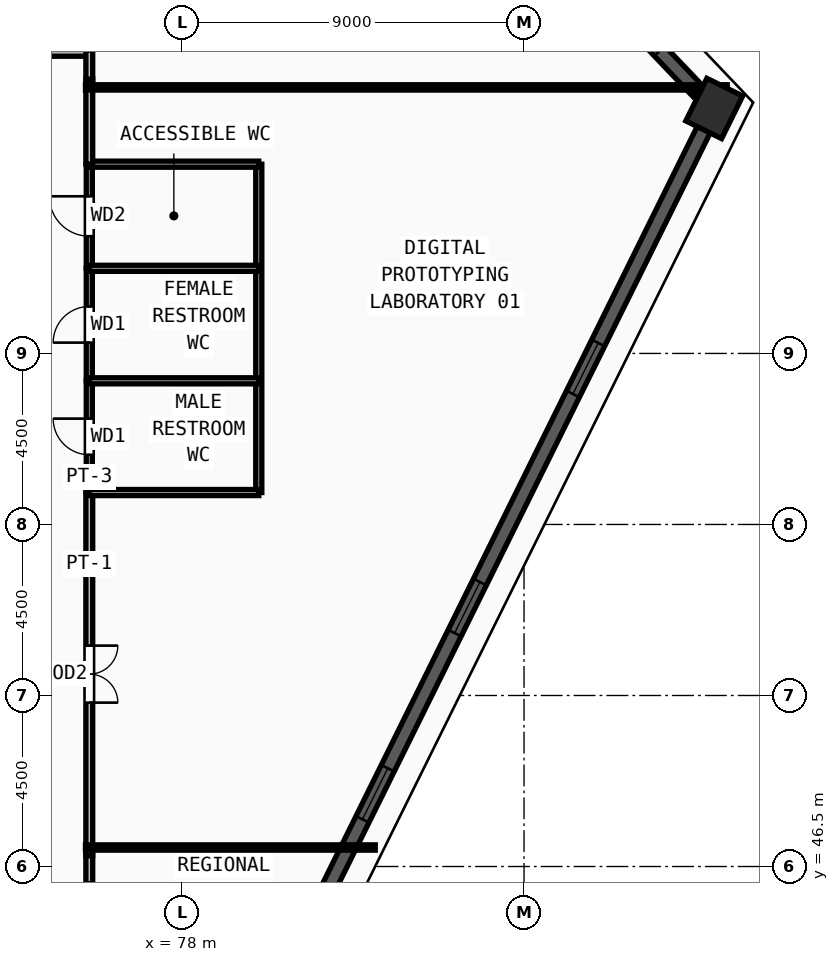
"""IFC4 building model, lengths in metres.
Left out: names, types, materials, properties, quantities, classifications, styles, units other than length and angle.
Written with IfcOpenShell. Run it as: python <this file> out.ifc"""

import sys

from ifc_helpers import new_model, si_unit, direction, frame, frame_2d, origin, origin_2d, place, context, subcontext, project, spatial, rectangle, extrude, source, transform, mapped, element, fill, save


model = new_model("IFC4")
c1 = context("Model", 3, precision=1e-05, world=origin(), true_north=direction((0.0, 1.0)))
c2 = subcontext(c1, "Body", "Model", "MODEL_VIEW")
j1 = project(units=[si_unit("LENGTHUNIT", "METRE"), si_unit("PLANEANGLEUNIT", "RADIAN")], contexts=[c1])
p1 = place(None, origin())
s1 = spatial("IfcSite", under=j1, at=p1, CompositionType="ELEMENT")
p2 = place(p1, origin())
s2 = spatial("IfcBuilding", under=s1, at=p2, CompositionType="ELEMENT")
p3 = place(p2, frame((0.0, 0.0, 247.5)))
s3 = spatial("IfcBuildingStorey", under=s2, at=p3, CompositionType="ELEMENT", Elevation=247.5)
m1 = source(origin(), c2, "Body", "SweptSolid", [
    extrude(rectangle(XDim=1.25, YDim=1.05, at=origin_2d()), origin(), (0.0, 0.0, 1.0), 3.75),
])
p4 = place(p3, frame((92.005, 66.446, 0.0), z_axis=(0.0, 0.0, 1.0), x_axis=(0.443540529265, 0.896254315973, 0.0)))
e1 = element("IfcColumn", 1, at=p4, inside=s3, PredefinedType="COLUMN", context=c2, shape_type="MappedRepresentation", body=[
    mapped(m1, transform((0.0, 0.0, 0.0), x_axis=(1.0, 0.0, 0.0), y_axis=(0.0, 1.0, 0.0), z_axis=(0.0, 0.0, 1.0), scale=1.0)),
])
p5 = place(p3, frame((79.281, 40.733, 0.0), z_axis=(0.0, 0.0, 1.0), x_axis=(0.44350165784, 0.896273551709, 0.0)))
e2 = element("IfcWall", 2, at=p5, inside=s3, PredefinedType="SOLIDWALL", context=c2, shape_type="SweptSolid", body=[
    extrude(rectangle(XDim=28.074, YDim=0.38, at=frame_2d((14.037, 0.0))), origin(), (0.0, 0.0, 1.0), 3.57),
])
m2 = source(origin(), c2, "Body", "SweptSolid", [
    extrude(rectangle(XDim=1.5, YDim=1.9, at=frame_2d((0.75, 0.95))), frame((0.0, 0.2, 0.0), z_axis=(0.0, -1.0, 0.0), x_axis=(1.0, 0.0, 0.0)), (0.0, 0.0, 1.0), 0.4),
])
p6 = place(p5, frame((7.819, 0.0, 0.55)))
e3 = element("IfcOpeningElement", 3, at=p6, cuts=e2, PredefinedType="OPENING", context=c2, shape_type="MappedRepresentation", body=[
    mapped(m2, transform((0.0, 0.0, 0.0), x_axis=(1.0, 0.0, 0.0), y_axis=(0.0, 1.0, 0.0), z_axis=(0.0, 0.0, 1.0), scale=1.0)),
])
p7 = place(p5, frame((13.287, 0.0, 0.55)))
e4 = element("IfcOpeningElement", 4, at=p7, cuts=e2, PredefinedType="OPENING", context=c2, shape_type="MappedRepresentation", body=[
    mapped(m2, transform((0.0, 0.0, 0.0), x_axis=(1.0, 0.0, 0.0), y_axis=(0.0, 1.0, 0.0), z_axis=(0.0, 0.0, 1.0), scale=1.0)),
])
p8 = place(p5, frame((20.306, 0.0, 0.55)))
e5 = element("IfcOpeningElement", 5, at=p8, cuts=e2, PredefinedType="OPENING", context=c2, shape_type="MappedRepresentation", body=[
    mapped(m2, transform((0.0, 0.0, 0.0), x_axis=(1.0, 0.0, 0.0), y_axis=(0.0, 1.0, 0.0), z_axis=(0.0, 0.0, 1.0), scale=1.0)),
])
p9 = place(p3, frame((91.581, 66.892, 0.0), z_axis=(0.0, 0.0, 1.0), x_axis=(-0.689387303183, 0.724392950139, 0.0)))
e6 = element("IfcWall", 6, at=p9, inside=s3, PredefinedType="SOLIDWALL", context=c2, shape_type="SweptSolid", body=[
    extrude(rectangle(XDim=4.143, YDim=0.38, at=frame_2d((2.071, 0.0))), origin(), (0.0, 0.0, 1.0), 3.57),
])
m3 = source(origin(), c2, "Body", "SweptSolid", [
    extrude(rectangle(XDim=1.2, YDim=1.9, at=frame_2d((0.6, 0.95))), frame((0.0, 0.2, 0.0), z_axis=(0.0, -1.0, 0.0), x_axis=(1.0, 0.0, 0.0)), (0.0, 0.0, 1.0), 0.4),
])
p10 = place(p9, frame((1.471, 0.0, 0.55)))
e7 = element("IfcOpeningElement", 7, at=p10, cuts=e6, PredefinedType="OPENING", context=c2, shape_type="MappedRepresentation", body=[
    mapped(m3, transform((0.0, 0.0, 0.0), x_axis=(1.0, 0.0, 0.0), y_axis=(0.0, 1.0, 0.0), z_axis=(0.0, 0.0, 1.0), scale=1.0)),
])
p11 = place(p3, frame((75.56, 56.34, 0.0), z_axis=(0.0, 0.0, 1.0), x_axis=(0.0, 1.0, 0.0)))
e8 = element("IfcWall", 8, at=p11, inside=s3, PredefinedType="PARTITIONING", context=c2, shape_type="SweptSolid", body=[
    extrude(rectangle(XDim=2.94, YDim=0.16, at=frame_2d((1.47, 0.0))), origin(), (0.0, 0.0, 1.0), 3.57),
])
m4 = source(origin(), c2, "Body", "SweptSolid", [
    extrude(rectangle(XDim=0.95, YDim=2.15, at=frame_2d((0.475, 1.075))), frame((0.0, 0.09, 0.0), z_axis=(0.0, -1.0, 0.0), x_axis=(1.0, 0.0, 0.0)), (0.0, 0.0, 1.0), 0.18),
])
p12 = place(p11, frame((0.995, 0.0, 0.0)))
e9 = element("IfcOpeningElement", 9, at=p12, cuts=e8, PredefinedType="OPENING", context=c2, shape_type="MappedRepresentation", body=[
    mapped(m4, transform((0.0, 0.0, 0.0), x_axis=(1.0, 0.0, 0.0), y_axis=(0.0, 1.0, 0.0), z_axis=(0.0, 0.0, 1.0), scale=1.0)),
])
p13 = place(p3, frame((75.56, 59.28, 0.0), z_axis=(0.0, 0.0, 1.0), x_axis=(0.0, 1.0, 0.0)))
e10 = element("IfcWall", 10, at=p13, inside=s3, PredefinedType="PARTITIONING", context=c2, shape_type="SweptSolid", body=[
    extrude(rectangle(XDim=2.96, YDim=0.16, at=frame_2d((1.48, 0.0))), origin(), (0.0, 0.0, 1.0), 3.57),
])
p14 = place(p13, frame((1.005, 0.0, 0.0)))
e11 = element("IfcOpeningElement", 11, at=p14, cuts=e10, PredefinedType="OPENING", context=c2, shape_type="MappedRepresentation", body=[
    mapped(m4, transform((0.0, 0.0, 0.0), x_axis=(1.0, 0.0, 0.0), y_axis=(0.0, 1.0, 0.0), z_axis=(0.0, 0.0, 1.0), scale=1.0)),
])
p15 = place(p3, frame((75.56, 62.24, 0.0), z_axis=(0.0, 0.0, 1.0), x_axis=(0.0, 1.0, 0.0)))
e12 = element("IfcWall", 12, at=p15, inside=s3, PredefinedType="PARTITIONING", context=c2, shape_type="SweptSolid", body=[
    extrude(rectangle(XDim=2.74, YDim=0.16, at=frame_2d((1.37, 0.0))), origin(), (0.0, 0.0, 1.0), 3.57),
])
m5 = source(origin(), c2, "Body", "SweptSolid", [
    extrude(rectangle(XDim=1.05, YDim=2.15, at=frame_2d((0.525, 1.075))), frame((0.0, 0.09, 0.0), z_axis=(0.0, -1.0, 0.0), x_axis=(1.0, 0.0, 0.0)), (0.0, 0.0, 1.0), 0.18),
])
p16 = place(p15, frame((0.845, 0.0, 0.0)))
e13 = element("IfcOpeningElement", 13, at=p16, cuts=e12, PredefinedType="OPENING", context=c2, shape_type="MappedRepresentation", body=[
    mapped(m5, transform((0.0, 0.0, 0.0), x_axis=(1.0, 0.0, 0.0), y_axis=(0.0, 1.0, 0.0), z_axis=(0.0, 0.0, 1.0), scale=1.0)),
])
p17 = place(p3, frame((75.56, 56.34, 0.0), z_axis=(0.0, 0.0, 1.0), x_axis=(0.0, -1.0, 0.0)))
e14 = element("IfcWall", 14, at=p17, inside=s3, PredefinedType="PARTITIONING", context=c2, shape_type="SweptSolid", body=[
    extrude(rectangle(XDim=9.555, YDim=0.18, at=frame_2d((4.778, 0.0))), origin(), (0.0, 0.0, 1.0), 3.57),
])
m6 = source(origin(), c2, "Body", "SweptSolid", [
    extrude(rectangle(XDim=1.5, YDim=2.2, at=frame_2d((0.75, 1.1))), frame((0.0, 0.1, 0.0), z_axis=(0.0, -1.0, 0.0), x_axis=(1.0, 0.0, 0.0)), (0.0, 0.0, 1.0), 0.2),
])
p18 = place(p17, frame((4.028, 0.0, 0.0)))
e15 = element("IfcOpeningElement", 15, at=p18, cuts=e14, PredefinedType="OPENING", context=c2, shape_type="MappedRepresentation", body=[
    mapped(m6, transform((0.0, 0.0, 0.0), x_axis=(1.0, 0.0, 0.0), y_axis=(0.0, 1.0, 0.0), z_axis=(0.0, 0.0, 1.0), scale=1.0)),
])
p19 = place(p3, frame((67.285, 67.91, 0.0), z_axis=(0.0, 0.0, 1.0), x_axis=(1.0, 0.0, 0.0)))
e16 = element("IfcWall", 16, at=p19, inside=s3, PredefinedType="PARTITIONING", context=c2, shape_type="SweptSolid", body=[
    extrude(rectangle(XDim=8.345, YDim=0.18, at=frame_2d((4.172, 0.0))), origin(), (0.0, 0.0, 1.0), 3.205),
])
p20 = place(p19, frame((3.422, 0.0, 0.0)))
e17 = element("IfcOpeningElement", 17, at=p20, cuts=e16, PredefinedType="OPENING", context=c2, shape_type="MappedRepresentation", body=[
    mapped(m6, transform((0.0, 0.0, 0.0), x_axis=(1.0, 0.0, 0.0), y_axis=(0.0, 1.0, 0.0), z_axis=(0.0, 0.0, 1.0), scale=1.0)),
])
p21 = place(p3, frame((75.56, 46.785, 0.0), z_axis=(0.0, 0.0, 1.0), x_axis=(0.0, -1.0, 0.0)))
e18 = element("IfcWall", 18, at=p21, inside=s3, PredefinedType="PARTITIONING", context=c2, shape_type="SweptSolid", body=[
    extrude(rectangle(XDim=2.4, YDim=0.18, at=frame_2d((1.2, 0.0))), origin(), (0.0, 0.0, 1.0), 3.57),
])
m7 = source(origin(), c2, "Body", "SweptSolid", [
    extrude(rectangle(XDim=1.0, YDim=2.2, at=frame_2d((0.5, 1.1))), frame((0.0, 0.1, 0.0), z_axis=(0.0, -1.0, 0.0), x_axis=(1.0, 0.0, 0.0)), (0.0, 0.0, 1.0), 0.2),
])
p22 = place(p21, frame((0.7, 0.0, 0.0)))
e19 = element("IfcOpeningElement", 19, at=p22, cuts=e18, PredefinedType="OPENING", context=c2, shape_type="MappedRepresentation", body=[
    mapped(m7, transform((0.0, 0.0, 0.0), x_axis=(1.0, 0.0, 0.0), y_axis=(0.0, 1.0, 0.0), z_axis=(0.0, 0.0, 1.0), scale=1.0)),
])
p23 = place(p3, frame((80.02, 56.34, 0.0), z_axis=(0.0, 0.0, 1.0), x_axis=(0.0, 1.0, 0.0)))
e20 = element("IfcWall", 20, at=p23, inside=s3, PredefinedType="PARTITIONING", context=c2, shape_type="SweptSolid", body=[
    extrude(rectangle(XDim=8.64, YDim=0.16, at=frame_2d((4.32, 0.0))), origin(), (0.0, 0.0, 1.0), 3.57),
])
for number, where, z_axis, x_axis in (
    (21, (75.56, 56.34, 0.0), (0.0, 0.0, 1.0), (1.0, 0.0, 0.0)),
    (22, (75.56, 59.28, 0.0), (0.0, 0.0, 1.0), (1.0, 0.0, 0.0)),
    (23, (75.56, 62.24, 0.0), (0.0, 0.0, 1.0), (1.0, 0.0, 0.0)),
    (24, (75.56, 64.98, 0.0), (0.0, 0.0, 1.0), (1.0, 0.0, 0.0)),
):
    element("IfcWall", number, at=place(p3, frame(where, z_axis=z_axis, x_axis=x_axis)), inside=s3, PredefinedType="PARTITIONING", context=c2, shape_type="SweptSolid", body=[
        extrude(rectangle(XDim=4.46, YDim=0.16, at=frame_2d((2.23, 0.0))), origin(), (0.0, 0.0, 1.0), 3.57),
    ])
p24 = place(p3, frame((75.56, 67.215, 0.0), z_axis=(0.0, 0.0, 1.0), x_axis=(0.0, -1.0, 0.0)))
e25 = element("IfcWall", 25, at=p24, inside=s3, PredefinedType="PARTITIONING", context=c2, shape_type="SweptSolid", body=[
    extrude(rectangle(XDim=2.235, YDim=0.18, at=frame_2d((1.118, 0.0))), origin(), (0.0, 0.0, 1.0), 3.57),
])
p25 = place(p3, frame((75.56, 67.98, 0.0), z_axis=(0.0, 0.0, 1.0), x_axis=(0.0, -1.0, 0.0)))
e26 = element("IfcWall", 26, at=p25, inside=s3, PredefinedType="PARTITIONING", context=c2, shape_type="SweptSolid", body=[
    extrude(rectangle(XDim=0.765, YDim=0.18, at=frame_2d((0.382, 0.0))), origin(), (0.0, 0.0, 1.0), 3.57),
])
p26 = place(p3, frame((75.46, 47.0, 0.0), z_axis=(0.0, 0.0, 1.0), x_axis=(1.0, 0.0, 0.0)))
e27 = element("IfcWall", 27, at=p26, inside=s3, PredefinedType="PARTITIONING", context=c2, shape_type="SweptSolid", body=[
    extrude(rectangle(XDim=7.625, YDim=0.14, at=frame_2d((3.812, 0.0))), origin(), (0.0, 0.0, 1.0), 3.57),
])
p27 = place(p3, frame((75.46, 67.0, 0.0), z_axis=(0.0, 0.0, 1.0), x_axis=(1.0, 0.0, 0.0)))
e28 = element("IfcWall", 28, at=p27, inside=s3, PredefinedType="PARTITIONING", context=c2, shape_type="SweptSolid", body=[
    extrude(rectangle(XDim=16.888, YDim=0.14, at=frame_2d((8.444, 0.0))), origin(), (0.0, 0.0, 1.0), 3.57),
])
m8 = source(origin(), c2, "Body", "SweptSolid", [
    extrude(rectangle(XDim=1.5, YDim=1.9, at=frame_2d((0.75, 0.95))), frame((0.0, 0.03, 0.0), z_axis=(0.0, -1.0, 0.0), x_axis=(1.0, 0.0, 0.0)), (0.0, 0.0, 1.0), 0.06),
])
p28 = place(p6, origin())
e29 = element("IfcWindow", 29, at=p28, inside=s3, PartitioningType="DOUBLE_PANEL_VERTICAL", PredefinedType="WINDOW", context=c2, shape_type="MappedRepresentation", body=[
    mapped(m8, transform((0.0, 0.0, 0.0), x_axis=(1.0, 0.0, 0.0), y_axis=(0.0, 1.0, 0.0), z_axis=(0.0, 0.0, 1.0), scale=1.0)),
])
fill(e3, e29)
p29 = place(p7, origin())
e30 = element("IfcWindow", 30, at=p29, inside=s3, PartitioningType="DOUBLE_PANEL_VERTICAL", PredefinedType="WINDOW", context=c2, shape_type="MappedRepresentation", body=[
    mapped(m8, transform((0.0, 0.0, 0.0), x_axis=(1.0, 0.0, 0.0), y_axis=(0.0, 1.0, 0.0), z_axis=(0.0, 0.0, 1.0), scale=1.0)),
])
fill(e4, e30)
p30 = place(p8, origin())
e31 = element("IfcWindow", 31, at=p30, inside=s3, PartitioningType="DOUBLE_PANEL_VERTICAL", PredefinedType="WINDOW", context=c2, shape_type="MappedRepresentation", body=[
    mapped(m8, transform((0.0, 0.0, 0.0), x_axis=(1.0, 0.0, 0.0), y_axis=(0.0, 1.0, 0.0), z_axis=(0.0, 0.0, 1.0), scale=1.0)),
])
fill(e5, e31)
m9 = source(origin(), c2, "Body", "SweptSolid", [
    extrude(rectangle(XDim=0.95, YDim=2.15, at=frame_2d((0.475, 1.075))), frame((0.0, 0.025, 0.0), z_axis=(0.0, -1.0, 0.0), x_axis=(1.0, 0.0, 0.0)), (0.0, 0.0, 1.0), 0.05),
])
p31 = place(p12, origin())
e32 = element("IfcDoor", 32, at=p31, inside=s3, OperationType="SINGLE_SWING_RIGHT", PredefinedType="DOOR", context=c2, shape_type="MappedRepresentation", body=[
    mapped(m9, transform((0.0, 0.0, 0.0), x_axis=(1.0, 0.0, 0.0), y_axis=(0.0, 1.0, 0.0), z_axis=(0.0, 0.0, 1.0), scale=1.0)),
])
fill(e9, e32)
p32 = place(p14, origin())
e33 = element("IfcDoor", 33, at=p32, inside=s3, OperationType="SINGLE_SWING_LEFT", PredefinedType="DOOR", context=c2, shape_type="MappedRepresentation", body=[
    mapped(m9, transform((0.0, 0.0, 0.0), x_axis=(1.0, 0.0, 0.0), y_axis=(0.0, 1.0, 0.0), z_axis=(0.0, 0.0, 1.0), scale=1.0)),
])
fill(e11, e33)
m10 = source(origin(), c2, "Body", "SweptSolid", [
    extrude(rectangle(XDim=1.05, YDim=2.15, at=frame_2d((0.525, 1.075))), frame((0.0, 0.025, 0.0), z_axis=(0.0, -1.0, 0.0), x_axis=(1.0, 0.0, 0.0)), (0.0, 0.0, 1.0), 0.05),
])
p33 = place(p16, origin())
e34 = element("IfcDoor", 34, at=p33, inside=s3, OperationType="SINGLE_SWING_RIGHT", PredefinedType="DOOR", context=c2, shape_type="MappedRepresentation", body=[
    mapped(m10, transform((0.0, 0.0, 0.0), x_axis=(1.0, 0.0, 0.0), y_axis=(0.0, 1.0, 0.0), z_axis=(0.0, 0.0, 1.0), scale=1.0)),
])
fill(e13, e34)
m11 = source(origin(), c2, "Body", "SweptSolid", [
    extrude(rectangle(XDim=1.5, YDim=2.2, at=frame_2d((0.75, 1.1))), frame((0.0, 0.025, 0.0), z_axis=(0.0, -1.0, 0.0), x_axis=(1.0, 0.0, 0.0)), (0.0, 0.0, 1.0), 0.05),
])
p34 = place(p18, origin())
e35 = element("IfcDoor", 35, at=p34, inside=s3, OperationType="DOUBLE_DOOR_SINGLE_SWING", PredefinedType="DOOR", context=c2, shape_type="MappedRepresentation", body=[
    mapped(m11, transform((0.0, 0.0, 0.0), x_axis=(1.0, 0.0, 0.0), y_axis=(0.0, 1.0, 0.0), z_axis=(0.0, 0.0, 1.0), scale=1.0)),
])
fill(e15, e35)
m12 = source(origin(), c2, "Body", "SweptSolid", [
    extrude(rectangle(XDim=1.0, YDim=2.2, at=frame_2d((0.5, 1.1))), frame((0.0, 0.025, 0.0), z_axis=(0.0, -1.0, 0.0), x_axis=(1.0, 0.0, 0.0)), (0.0, 0.0, 1.0), 0.05),
])
p35 = place(p22, origin())
e36 = element("IfcDoor", 36, at=p35, inside=s3, OperationType="SINGLE_SWING_RIGHT", PredefinedType="DOOR", context=c2, shape_type="MappedRepresentation", body=[
    mapped(m12, transform((0.0, 0.0, 0.0), x_axis=(1.0, 0.0, 0.0), y_axis=(0.0, 1.0, 0.0), z_axis=(0.0, 0.0, 1.0), scale=1.0)),
])
fill(e19, e36)
save(model, sys.argv[1])
